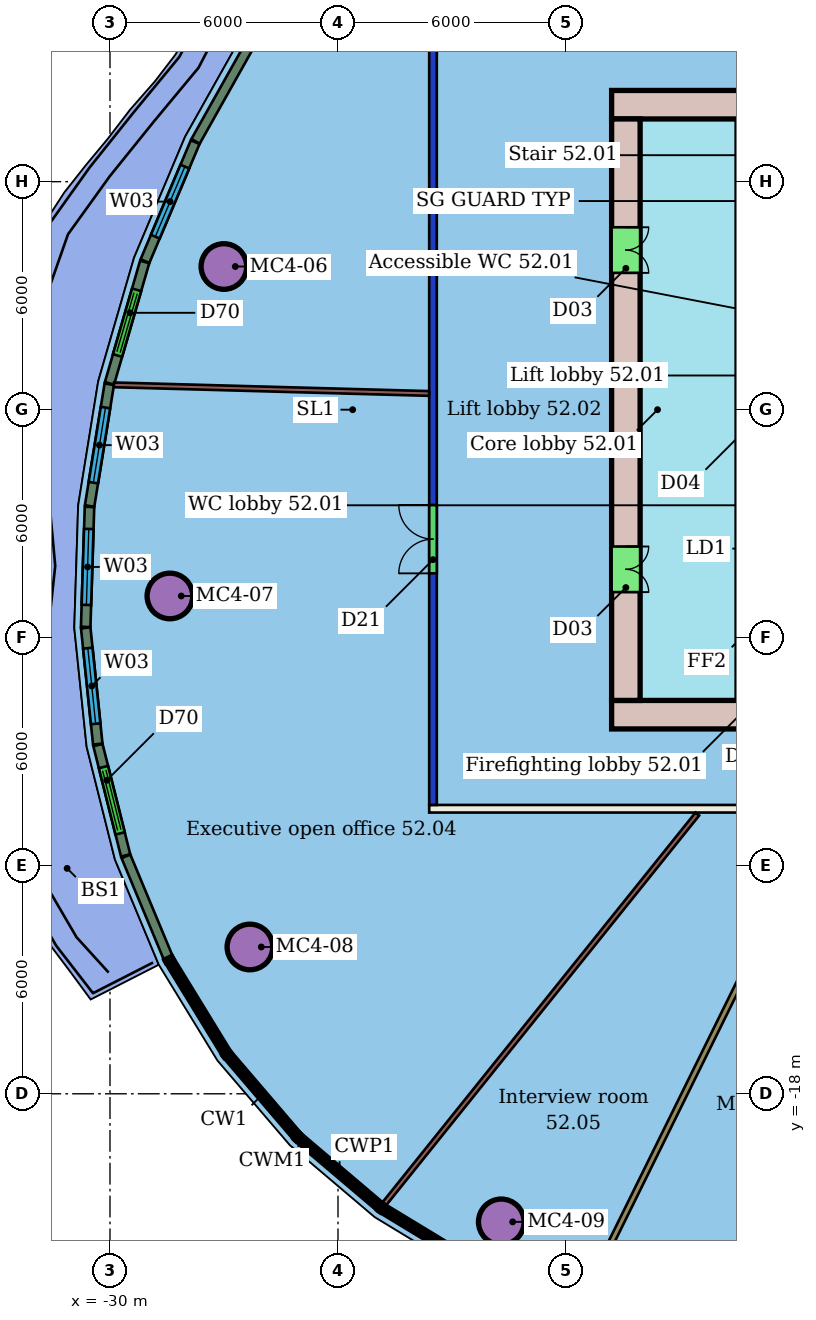
"""IFC4 building model, lengths in metres.
Left out: names, types, materials, properties, quantities, classifications, styles, units other than length and angle.
Written with IfcOpenShell. Run it as: python <this file> out.ifc"""

import sys

from ifc_helpers import new_model, si_unit, direction, frame, frame_2d, origin, origin_2d, place, context, subcontext, project, spatial, rectangle, hollow_circle, extrude, element, fill, save


model = new_model("IFC4")
c1 = context("Model", 3, precision=1e-05, world=origin(), true_north=direction((0.0, 1.0)))
c2 = subcontext(c1, "Body", "Model", "MODEL_VIEW")
j1 = project(units=[si_unit("LENGTHUNIT", "METRE"), si_unit("PLANEANGLEUNIT", "RADIAN")], contexts=[c1])
p1 = place(None, origin())
s1 = spatial("IfcSite", under=j1, at=p1, CompositionType="ELEMENT")
p2 = place(p1, origin())
s2 = spatial("IfcBuilding", under=s1, at=p2, CompositionType="ELEMENT")
p3 = place(p2, frame((0.0, 0.0, 213.7)))
s3 = spatial("IfcBuildingStorey", under=s2, at=p3, CompositionType="ELEMENT", Elevation=213.7)
for number, where, z_axis, x_axis in (
    (1, (-27.003, 3.768, 0.0), (0.0, 0.0, 1.0), (1.0, 0.0, 0.0)),
    (2, (-28.424, -4.901, 0.0), (0.0, 0.0, 1.0), (1.0, 0.0, 0.0)),
    (3, (-26.318, -14.137, 0.0), (0.0, 0.0, 1.0), (1.0, 0.0, 0.0)),
    (4, (-19.704, -21.37, 0.0), (0.0, 0.0, 1.0), (1.0, 0.0, 0.0)),
):
    element("IfcColumn", number, at=place(p3, frame(where, z_axis=z_axis, x_axis=x_axis)), inside=s3, PredefinedType="COLUMN", context=c2, shape_type="SweptSolid", body=[
        extrude(hollow_circle(Radius=0.6, WallThickness=0.045, at=origin_2d()), origin(), (0.0, 0.0, 1.0), 3.45),
    ])
p4 = place(p3, frame((9.6, -10.5, 0.0), z_axis=(0.0, 0.0, 1.0), x_axis=(-1.0, 0.0, 0.0)))
e5 = element("IfcWall", 5, at=p4, inside=s3, PredefinedType="PARTITIONING", context=c2, shape_type="SweptSolid", body=[
    extrude(rectangle(XDim=31.2, YDim=0.2, at=frame_2d((15.6, 0.0))), origin(), (0.0, 0.0, 1.0), 3.45),
])
p5 = place(p4, frame((21.715, 0.0, 0.0)))
e6 = element("IfcOpeningElement", 6, at=p5, cuts=e5, PredefinedType="OPENING", context=c2, shape_type="SweptSolid", body=[
    extrude(rectangle(XDim=0.9, YDim=2.1, at=frame_2d((0.45, 1.05))), frame((0.0, 0.11, 0.0), z_axis=(0.0, -1.0, 0.0), x_axis=(1.0, 0.0, 0.0)), (0.0, 0.0, 1.0), 0.22),
])
p6 = place(p4, frame((18.751, 0.0, 0.0)))
e7 = element("IfcOpeningElement", 7, at=p6, cuts=e5, PredefinedType="OPENING", context=c2, shape_type="SweptSolid", body=[
    extrude(rectangle(XDim=0.9, YDim=2.1, at=frame_2d((0.45, 1.05))), frame((0.0, 0.11, 0.0), z_axis=(0.0, -1.0, 0.0), x_axis=(1.0, 0.0, 0.0)), (0.0, 0.0, 1.0), 0.22),
])
p7 = place(p4, frame((8.129, 0.0, 0.0)))
e8 = element("IfcOpeningElement", 8, at=p7, cuts=e5, PredefinedType="OPENING", context=c2, shape_type="SweptSolid", body=[
    extrude(rectangle(XDim=1.8, YDim=2.4, at=frame_2d((0.9, 1.2))), frame((0.0, 0.11, 0.0), z_axis=(0.0, -1.0, 0.0), x_axis=(1.0, 0.0, 0.0)), (0.0, 0.0, 1.0), 0.22),
])
p8 = place(p3, frame((-21.5, -10.4, 0.0), z_axis=(0.0, 0.0, 1.0), x_axis=(0.0, 1.0, 0.0)))
e9 = element("IfcWall", 9, at=p8, inside=s3, PredefinedType="PARTITIONING", context=c2, shape_type="SweptSolid", body=[
    extrude(rectangle(XDim=20.8, YDim=0.2, at=frame_2d((10.4, 0.0))), origin(), (0.0, 0.0, 1.0), 3.05),
])
p9 = place(p8, frame((6.094, 0.0, 0.0)))
e10 = element("IfcOpeningElement", 10, at=p9, cuts=e9, PredefinedType="OPENING", context=c2, shape_type="SweptSolid", body=[
    extrude(rectangle(XDim=1.8, YDim=2.1, at=frame_2d((0.9, 1.05))), frame((0.0, 0.11, 0.0), z_axis=(0.0, -1.0, 0.0), x_axis=(1.0, 0.0, 0.0)), (0.0, 0.0, 1.0), 0.22),
])
p10 = place(p3, frame((-29.895, 0.654, 0.0), z_axis=(0.0, 0.0, 1.0), x_axis=(0.999626262379, -0.02733743885, 0.0)))
e11 = element("IfcWall", 11, at=p10, inside=s3, PredefinedType="PARTITIONING", context=c2, shape_type="SweptSolid", body=[
    extrude(rectangle(XDim=8.297, YDim=0.125, at=frame_2d((4.148, 0.0))), origin(), (0.0, 0.0, 1.0), 3.45),
])
p11 = place(p3, frame((-22.786, -20.9, 0.0), z_axis=(0.0, 0.0, 1.0), x_axis=(0.626186985821, 0.779672917824, 0.0)))
e12 = element("IfcWall", 12, at=p11, inside=s3, PredefinedType="PARTITIONING", context=c2, shape_type="SweptSolid", body=[
    extrude(rectangle(XDim=13.161, YDim=0.125, at=frame_2d((6.581, 0.0))), origin(), (0.0, 0.0, 1.0), 3.45),
])
p12 = place(p3, frame((-17.603, -23.515, 0.0), z_axis=(0.0, 0.0, 1.0), x_axis=(0.442482556449, 0.896777111237, 0.0)))
e13 = element("IfcWall", 13, at=p12, inside=s3, PredefinedType="PARTITIONING", context=c2, shape_type="SweptSolid", body=[
    extrude(rectangle(XDim=14.365, YDim=0.15, at=frame_2d((7.182, 0.0))), origin(), (0.0, 0.0, 1.0), 3.45),
])
p13 = place(p3, frame((-26.077, 10.035, 0.0), z_axis=(0.0, 0.0, 1.0), x_axis=(-0.489914644591, -0.871770406136, 0.0)))
e14 = element("IfcWall", 14, at=p13, inside=s3, PredefinedType="SOLIDWALL", context=c2, shape_type="SweptSolid", body=[
    extrude(rectangle(XDim=3.412, YDim=0.25, at=frame_2d((1.706, 0.0))), origin(), (0.0, 0.0, 1.0), 3.1),
])
p14 = place(p3, frame((-27.758, 7.041, 0.0), z_axis=(0.0, 0.0, 1.0), x_axis=(-0.388763390527, -0.921337628769, 0.0)))
e15 = element("IfcWall", 15, at=p14, inside=s3, PredefinedType="SOLIDWALL", context=c2, shape_type="SweptSolid", body=[
    extrude(rectangle(XDim=3.399, YDim=0.25, at=frame_2d((1.699, 0.0))), origin(), (0.0, 0.0, 1.0), 3.1),
])
p15 = place(p14, frame((0.699, 0.0, 0.9)))
e16 = element("IfcOpeningElement", 16, at=p15, cuts=e15, PredefinedType="OPENING", context=c2, shape_type="SweptSolid", body=[
    extrude(rectangle(XDim=2.0, YDim=2.1, at=frame_2d((1.0, 1.05))), frame((0.0, 0.135, 0.0), z_axis=(0.0, -1.0, 0.0), x_axis=(1.0, 0.0, 0.0)), (0.0, 0.0, 1.0), 0.27),
])
p16 = place(p3, frame((-29.087, 3.888, 0.0), z_axis=(0.0, 0.0, 1.0), x_axis=(-0.278604991916, -0.960405778033, 0.0)))
e17 = element("IfcWall", 17, at=p16, inside=s3, PredefinedType="SOLIDWALL", context=c2, shape_type="SweptSolid", body=[
    extrude(rectangle(XDim=3.327, YDim=0.25, at=frame_2d((1.664, 0.0))), origin(), (0.0, 0.0, 1.0), 3.1),
])
p17 = place(p16, frame((0.764, 0.0, 0.0)))
e18 = element("IfcOpeningElement", 18, at=p17, cuts=e17, PredefinedType="OPENING", context=c2, shape_type="SweptSolid", body=[
    extrude(rectangle(XDim=1.8, YDim=2.4, at=frame_2d((0.9, 1.2))), frame((0.0, 0.135, 0.0), z_axis=(0.0, -1.0, 0.0), x_axis=(1.0, 0.0, 0.0)), (0.0, 0.0, 1.0), 0.27),
])
p18 = place(p3, frame((-30.019, 0.67, 0.0), z_axis=(0.0, 0.0, 1.0), x_axis=(-0.159457089841, -0.987204860452, 0.0)))
e19 = element("IfcWall", 19, at=p18, inside=s3, PredefinedType="SOLIDWALL", context=c2, shape_type="SweptSolid", body=[
    extrude(rectangle(XDim=3.246, YDim=0.25, at=frame_2d((1.623, 0.0))), origin(), (0.0, 0.0, 1.0), 3.1),
])
p19 = place(p18, frame((0.623, 0.0, 0.9)))
e20 = element("IfcOpeningElement", 20, at=p19, cuts=e19, PredefinedType="OPENING", context=c2, shape_type="SweptSolid", body=[
    extrude(rectangle(XDim=2.0, YDim=2.1, at=frame_2d((1.0, 1.05))), frame((0.0, 0.135, 0.0), z_axis=(0.0, -1.0, 0.0), x_axis=(1.0, 0.0, 0.0)), (0.0, 0.0, 1.0), 0.27),
])
p20 = place(p3, frame((-30.539, -2.558, 0.0), z_axis=(0.0, 0.0, 1.0), x_axis=(-0.031760681262, -0.999495502304, 0.0)))
e21 = element("IfcWall", 21, at=p20, inside=s3, PredefinedType="SOLIDWALL", context=c2, shape_type="SweptSolid", body=[
    extrude(rectangle(XDim=3.159, YDim=0.25, at=frame_2d((1.58, 0.0))), origin(), (0.0, 0.0, 1.0), 3.1),
])
p21 = place(p20, frame((0.58, 0.0, 0.9)))
e22 = element("IfcOpeningElement", 22, at=p21, cuts=e21, PredefinedType="OPENING", context=c2, shape_type="SweptSolid", body=[
    extrude(rectangle(XDim=2.0, YDim=2.1, at=frame_2d((1.0, 1.05))), frame((0.0, 0.135, 0.0), z_axis=(0.0, -1.0, 0.0), x_axis=(1.0, 0.0, 0.0)), (0.0, 0.0, 1.0), 0.27),
])
p22 = place(p3, frame((-30.639, -5.741, 0.0), z_axis=(0.0, 0.0, 1.0), x_axis=(0.10327045025, -0.994653313524, 0.0)))
e23 = element("IfcWall", 23, at=p22, inside=s3, PredefinedType="SOLIDWALL", context=c2, shape_type="SweptSolid", body=[
    extrude(rectangle(XDim=3.073, YDim=0.25, at=frame_2d((1.537, 0.0))), origin(), (0.0, 0.0, 1.0), 3.1),
])
p23 = place(p22, frame((0.537, 0.0, 0.9)))
e24 = element("IfcOpeningElement", 24, at=p23, cuts=e23, PredefinedType="OPENING", context=c2, shape_type="SweptSolid", body=[
    extrude(rectangle(XDim=2.0, YDim=2.1, at=frame_2d((1.0, 1.05))), frame((0.0, 0.135, 0.0), z_axis=(0.0, -1.0, 0.0), x_axis=(1.0, 0.0, 0.0)), (0.0, 0.0, 1.0), 0.27),
])
p24 = place(p3, frame((-30.317, -8.823, 0.0), z_axis=(0.0, 0.0, 1.0), x_axis=(0.243245471753, -0.96996476249, 0.0)))
e25 = element("IfcWall", 25, at=p24, inside=s3, PredefinedType="SOLIDWALL", context=c2, shape_type="SweptSolid", body=[
    extrude(rectangle(XDim=2.994, YDim=0.25, at=frame_2d((1.497, 0.0))), origin(), (0.0, 0.0, 1.0), 3.1),
])
p25 = place(p24, frame((0.597, 0.0, 0.0)))
e26 = element("IfcOpeningElement", 26, at=p25, cuts=e25, PredefinedType="OPENING", context=c2, shape_type="SweptSolid", body=[
    extrude(rectangle(XDim=1.8, YDim=2.4, at=frame_2d((0.9, 1.2))), frame((0.0, 0.135, 0.0), z_axis=(0.0, -1.0, 0.0), x_axis=(1.0, 0.0, 0.0)), (0.0, 0.0, 1.0), 0.27),
])
p26 = place(p3, frame((-29.58, -11.752, 0.0), z_axis=(0.0, 0.0, 1.0), x_axis=(0.384537301957, -0.923109453642, 0.0)))
e27 = element("IfcWall", 27, at=p26, inside=s3, PredefinedType="SOLIDWALL", context=c2, shape_type="SweptSolid", body=[
    extrude(rectangle(XDim=2.886, YDim=0.25, at=frame_2d((1.443, 0.0))), origin(), (0.0, 0.0, 1.0), 3.1),
])
p27 = place(p3, frame((-6.0, 8.025, 0.0), z_axis=(0.0, 0.0, 1.0), x_axis=(-1.0, 0.0, 0.0)))
e28 = element("IfcWall", 28, at=p27, inside=s3, PredefinedType="SHEAR", context=c2, shape_type="SweptSolid", body=[
    extrude(rectangle(XDim=10.8, YDim=0.75, at=frame_2d((5.4, 0.0))), origin(), (0.0, 0.0, 1.0), 3.3),
])
p28 = place(p27, frame((5.2, 0.0, 0.0)))
e29 = element("IfcOpeningElement", 29, at=p28, cuts=e28, PredefinedType="OPENING", context=c2, shape_type="SweptSolid", body=[
    extrude(rectangle(XDim=1.2, YDim=2.1, at=frame_2d((0.6, 1.05))), frame((0.0, 0.385, 0.0), z_axis=(0.0, -1.0, 0.0), x_axis=(1.0, 0.0, 0.0)), (0.0, 0.0, 1.0), 0.77),
])
p29 = place(p3, frame((-16.8, -8.025, 0.0), z_axis=(0.0, 0.0, 1.0), x_axis=(1.0, 0.0, 0.0)))
e30 = element("IfcWall", 30, at=p29, inside=s3, PredefinedType="SHEAR", context=c2, shape_type="SweptSolid", body=[
    extrude(rectangle(XDim=21.6, YDim=0.75, at=frame_2d((10.8, 0.0))), origin(), (0.0, 0.0, 1.0), 3.3),
])
p30 = place(p29, frame((4.8, 0.0, 0.0)))
e31 = element("IfcOpeningElement", 31, at=p30, cuts=e30, PredefinedType="OPENING", context=c2, shape_type="SweptSolid", body=[
    extrude(rectangle(XDim=1.2, YDim=2.1, at=frame_2d((0.6, 1.05))), frame((0.0, 0.385, 0.0), z_axis=(0.0, -1.0, 0.0), x_axis=(1.0, 0.0, 0.0)), (0.0, 0.0, 1.0), 0.77),
])
p31 = place(p3, frame((-16.425, 7.65, 0.0), z_axis=(0.0, 0.0, 1.0), x_axis=(0.0, -1.0, 0.0)))
e32 = element("IfcWall", 32, at=p31, inside=s3, PredefinedType="SHEAR", context=c2, shape_type="SweptSolid", body=[
    extrude(rectangle(XDim=15.3, YDim=0.75, at=frame_2d((7.65, 0.0))), origin(), (0.0, 0.0, 1.0), 3.3),
])
p32 = place(p31, frame((11.25, 0.0, 0.0)))
e33 = element("IfcOpeningElement", 33, at=p32, cuts=e32, PredefinedType="OPENING", context=c2, shape_type="SweptSolid", body=[
    extrude(rectangle(XDim=1.2, YDim=2.1, at=frame_2d((0.6, 1.05))), frame((0.0, 0.385, 0.0), z_axis=(0.0, -1.0, 0.0), x_axis=(1.0, 0.0, 0.0)), (0.0, 0.0, 1.0), 0.77),
])
p33 = place(p31, frame((2.85, 0.0, 0.0)))
e34 = element("IfcOpeningElement", 34, at=p33, cuts=e32, PredefinedType="OPENING", context=c2, shape_type="SweptSolid", body=[
    extrude(rectangle(XDim=1.2, YDim=2.1, at=frame_2d((0.6, 1.05))), frame((0.0, 0.385, 0.0), z_axis=(0.0, -1.0, 0.0), x_axis=(1.0, 0.0, 0.0)), (0.0, 0.0, 1.0), 0.77),
])
p34 = place(p9, origin())
e35 = element("IfcDoor", 35, at=p34, inside=s3, OperationType="DOUBLE_DOOR_SINGLE_SWING", PredefinedType="DOOR", context=c2, shape_type="SweptSolid", body=[
    extrude(rectangle(XDim=1.8, YDim=2.1, at=frame_2d((0.9, 1.05))), frame((0.0, 0.025, 0.0), z_axis=(0.0, -1.0, 0.0), x_axis=(1.0, 0.0, 0.0)), (0.0, 0.0, 1.0), 0.05),
])
fill(e10, e35)
p35 = place(p15, origin())
e36 = element("IfcWindow", 36, at=p35, inside=s3, PartitioningType="SINGLE_PANEL", PredefinedType="WINDOW", context=c2, shape_type="SweptSolid", body=[
    extrude(rectangle(XDim=2.0, YDim=2.1, at=frame_2d((1.0, 1.05))), frame((0.0, 0.03, 0.0), z_axis=(0.0, -1.0, 0.0), x_axis=(1.0, 0.0, 0.0)), (0.0, 0.0, 1.0), 0.06),
])
fill(e16, e36)
p36 = place(p17, origin())
e37 = element("IfcDoor", 37, at=p36, inside=s3, OperationType="DOUBLE_DOOR_SLIDING", PredefinedType="DOOR", context=c2, shape_type="SweptSolid", body=[
    extrude(rectangle(XDim=1.8, YDim=2.4, at=frame_2d((0.9, 1.2))), frame((0.0, 0.025, 0.0), z_axis=(0.0, -1.0, 0.0), x_axis=(1.0, 0.0, 0.0)), (0.0, 0.0, 1.0), 0.05),
])
fill(e18, e37)
p37 = place(p19, origin())
e38 = element("IfcWindow", 38, at=p37, inside=s3, PartitioningType="SINGLE_PANEL", PredefinedType="WINDOW", context=c2, shape_type="SweptSolid", body=[
    extrude(rectangle(XDim=2.0, YDim=2.1, at=frame_2d((1.0, 1.05))), frame((0.0, 0.03, 0.0), z_axis=(0.0, -1.0, 0.0), x_axis=(1.0, 0.0, 0.0)), (0.0, 0.0, 1.0), 0.06),
])
fill(e20, e38)
p38 = place(p21, origin())
e39 = element("IfcWindow", 39, at=p38, inside=s3, PartitioningType="SINGLE_PANEL", PredefinedType="WINDOW", context=c2, shape_type="SweptSolid", body=[
    extrude(rectangle(XDim=2.0, YDim=2.1, at=frame_2d((1.0, 1.05))), frame((0.0, 0.03, 0.0), z_axis=(0.0, -1.0, 0.0), x_axis=(1.0, 0.0, 0.0)), (0.0, 0.0, 1.0), 0.06),
])
fill(e22, e39)
p39 = place(p23, origin())
e40 = element("IfcWindow", 40, at=p39, inside=s3, PartitioningType="SINGLE_PANEL", PredefinedType="WINDOW", context=c2, shape_type="SweptSolid", body=[
    extrude(rectangle(XDim=2.0, YDim=2.1, at=frame_2d((1.0, 1.05))), frame((0.0, 0.03, 0.0), z_axis=(0.0, -1.0, 0.0), x_axis=(1.0, 0.0, 0.0)), (0.0, 0.0, 1.0), 0.06),
])
fill(e24, e40)
p40 = place(p25, origin())
e41 = element("IfcDoor", 41, at=p40, inside=s3, OperationType="DOUBLE_DOOR_SLIDING", PredefinedType="DOOR", context=c2, shape_type="SweptSolid", body=[
    extrude(rectangle(XDim=1.8, YDim=2.4, at=frame_2d((0.9, 1.2))), frame((0.0, 0.025, 0.0), z_axis=(0.0, -1.0, 0.0), x_axis=(1.0, 0.0, 0.0)), (0.0, 0.0, 1.0), 0.05),
])
fill(e26, e41)
p41 = place(p32, origin())
e42 = element("IfcDoor", 42, at=p41, inside=s3, OperationType="DOUBLE_DOOR_SINGLE_SWING", PredefinedType="NOTDEFINED", context=c2, shape_type="SweptSolid", body=[
    extrude(rectangle(XDim=1.2, YDim=2.1, at=frame_2d((0.6, 1.05))), frame((0.0, 0.025, 0.0), z_axis=(0.0, -1.0, 0.0), x_axis=(1.0, 0.0, 0.0)), (0.0, 0.0, 1.0), 0.05),
])
fill(e33, e42)
p42 = place(p33, origin())
e43 = element("IfcDoor", 43, at=p42, inside=s3, OperationType="DOUBLE_DOOR_SINGLE_SWING", PredefinedType="NOTDEFINED", context=c2, shape_type="SweptSolid", body=[
    extrude(rectangle(XDim=1.2, YDim=2.1, at=frame_2d((0.6, 1.05))), frame((0.0, 0.025, 0.0), z_axis=(0.0, -1.0, 0.0), x_axis=(1.0, 0.0, 0.0)), (0.0, 0.0, 1.0), 0.05),
])
fill(e34, e43)
save(model, sys.argv[1])
